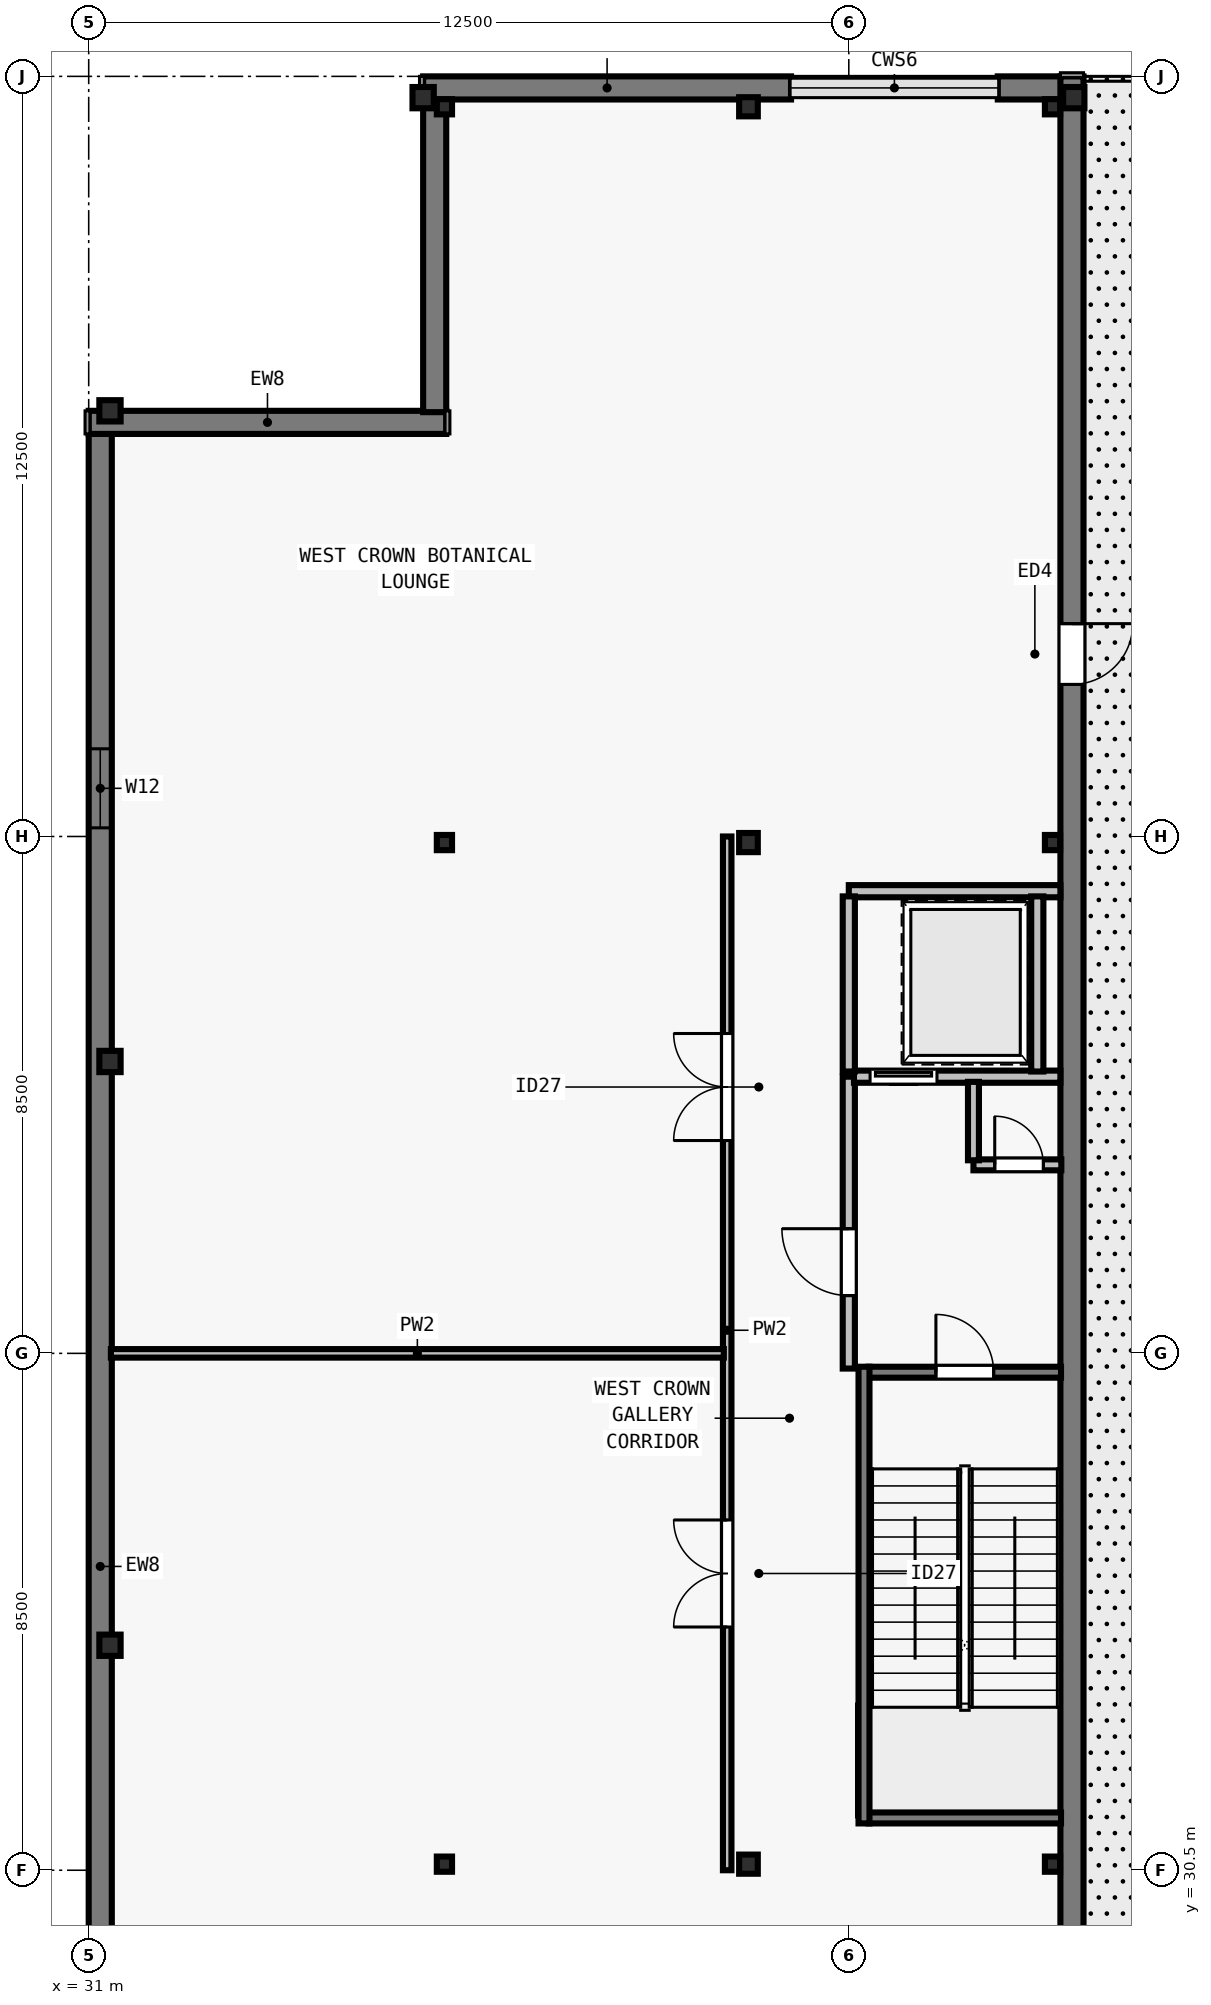
"""IFC4 building model, lengths in metres.
Left out: names, types, materials, properties, quantities, classifications, styles, units other than length and angle.
Written with IfcOpenShell. Run it as: python <this file> out.ifc"""

import sys

from ifc_helpers import new_model, si_unit, direction, frame, frame_2d, origin, origin_2d, place, context, subcontext, project, spatial, rectangle, i_section, extrude, element, fill, save


model = new_model("IFC4")
c1 = context("Model", 3, precision=1e-05, world=origin(), true_north=direction((0.0, 1.0)))
c2 = subcontext(c1, "Body", "Model", "MODEL_VIEW")
j1 = project(units=[si_unit("LENGTHUNIT", "METRE"), si_unit("PLANEANGLEUNIT", "RADIAN")], contexts=[c1])
p1 = place(None, origin())
s1 = spatial("IfcSite", under=j1, at=p1, CompositionType="ELEMENT")
p2 = place(p1, origin())
s2 = spatial("IfcBuilding", under=s1, at=p2, CompositionType="ELEMENT")
p3 = place(p2, frame((0.0, 0.0, 324.5)))
s3 = spatial("IfcBuildingStorey", under=s2, at=p3, CompositionType="ELEMENT", Elevation=324.5)
for number, where, z_axis, x_axis in (
    (1, (47.2, 59.65, 0.0), (0.0, 0.0, 1.0), (1.0, 0.0, 0.0)),
    (2, (36.5, 59.65, 0.0), (0.0, 0.0, 1.0), (1.0, 0.0, 0.0)),
    (3, (31.35, 54.5, 0.0), (0.0, 0.0, 1.0), (1.0, 0.0, 0.0)),
    (4, (31.35, 43.8, 0.0), (0.0, 0.0, 1.0), (1.0, 0.0, 0.0)),
    (5, (31.35, 34.2, 0.0), (0.0, 0.0, 1.0), (1.0, 0.0, 0.0)),
):
    element("IfcColumn", number, at=place(p3, frame(where, z_axis=z_axis, x_axis=x_axis)), inside=s3, PredefinedType="COLUMN", context=c2, shape_type="SweptSolid", body=[
        extrude(i_section(OverallWidth=0.35, OverallDepth=0.35, WebThickness=0.02, FlangeThickness=0.028, at=origin_2d()), origin(), (0.0, 0.0, 1.0), 5.5),
    ])
p4 = place(p3, frame((41.85, 30.6, 0.0), z_axis=(0.0, 0.0, 1.0), x_axis=(1.0, 0.0, 0.0)))
e6 = element("IfcColumn", 6, at=p4, inside=s3, PredefinedType="COLUMN", context=c2, shape_type="SweptSolid", body=[
    extrude(i_section(OverallWidth=0.307, OverallDepth=0.315, WebThickness=0.012, FlangeThickness=0.019, FilletRadius=0.016, at=origin_2d()), origin(), (0.0, 0.0, 1.0), 5.5),
])
for number, where, z_axis, x_axis in (
    (7, (36.85, 30.6, 0.0), (0.0, 0.0, 1.0), (1.0, 0.0, 0.0)),
    (8, (46.85, 30.6, 0.0), (0.0, 0.0, 1.0), (1.0, 0.0, 0.0)),
):
    element("IfcColumn", number, at=place(p3, frame(where, z_axis=z_axis, x_axis=x_axis)), inside=s3, PredefinedType="PILASTER", context=c2, shape_type="SweptSolid", body=[
        extrude(i_section(OverallWidth=0.203, OverallDepth=0.203, WebThickness=0.009, FlangeThickness=0.014, FilletRadius=0.01, at=origin_2d()), origin(), (0.0, 0.0, 1.0), 5.5),
    ])
p5 = place(p3, frame((41.85, 47.4, 0.0), z_axis=(0.0, 0.0, 1.0), x_axis=(1.0, 0.0, 0.0)))
e9 = element("IfcColumn", 9, at=p5, inside=s3, PredefinedType="COLUMN", context=c2, shape_type="SweptSolid", body=[
    extrude(i_section(OverallWidth=0.307, OverallDepth=0.315, WebThickness=0.012, FlangeThickness=0.019, FilletRadius=0.016, at=origin_2d()), origin(), (0.0, 0.0, 1.0), 5.5),
])
for number, where, z_axis, x_axis in (
    (10, (36.85, 47.4, 0.0), (0.0, 0.0, 1.0), (1.0, 0.0, 0.0)),
    (11, (46.85, 47.4, 0.0), (0.0, 0.0, 1.0), (1.0, 0.0, 0.0)),
):
    element("IfcColumn", number, at=place(p3, frame(where, z_axis=z_axis, x_axis=x_axis)), inside=s3, PredefinedType="PILASTER", context=c2, shape_type="SweptSolid", body=[
        extrude(i_section(OverallWidth=0.203, OverallDepth=0.203, WebThickness=0.009, FlangeThickness=0.014, FilletRadius=0.01, at=origin_2d()), origin(), (0.0, 0.0, 1.0), 5.5),
    ])
p6 = place(p3, frame((41.85, 59.5, 0.0), z_axis=(0.0, 0.0, 1.0), x_axis=(1.0, 0.0, 0.0)))
e12 = element("IfcColumn", 12, at=p6, inside=s3, PredefinedType="COLUMN", context=c2, shape_type="SweptSolid", body=[
    extrude(i_section(OverallWidth=0.307, OverallDepth=0.315, WebThickness=0.012, FlangeThickness=0.019, FilletRadius=0.016, at=origin_2d()), origin(), (0.0, 0.0, 1.0), 5.5),
])
for number, where, z_axis, x_axis in (
    (13, (36.85, 59.5, 0.0), (0.0, 0.0, 1.0), (1.0, 0.0, 0.0)),
    (14, (46.85, 59.5, 0.0), (0.0, 0.0, 1.0), (1.0, 0.0, 0.0)),
):
    element("IfcColumn", number, at=place(p3, frame(where, z_axis=z_axis, x_axis=x_axis)), inside=s3, PredefinedType="PILASTER", context=c2, shape_type="SweptSolid", body=[
        extrude(i_section(OverallWidth=0.203, OverallDepth=0.203, WebThickness=0.009, FlangeThickness=0.014, FilletRadius=0.01, at=origin_2d()), origin(), (0.0, 0.0, 1.0), 5.5),
    ])
p7 = place(p3, frame((31.19, 23.5, 0.0), z_axis=(0.0, 0.0, 1.0), x_axis=(0.0, 1.0, 0.0)))
e15 = element("IfcWall", 15, at=p7, inside=s3, PredefinedType="SOLIDWALL", context=c2, shape_type="SweptSolid", body=[
    extrude(rectangle(XDim=30.642, YDim=0.38, at=frame_2d((15.321, 0.0))), origin(), (0.0, 0.0, 1.0), 5.25),
])
p8 = place(p7, frame((24.142, 0.0, 0.8)))
e16 = element("IfcOpeningElement", 16, at=p8, cuts=e15, PredefinedType="OPENING", context=c2, shape_type="SweptSolid", body=[
    extrude(rectangle(XDim=1.3, YDim=2.05, at=frame_2d((0.65, 1.025))), frame((0.0, 0.2, 0.0), z_axis=(0.0, -1.0, 0.0), x_axis=(1.0, 0.0, 0.0)), (0.0, 0.0, 1.0), 0.4),
])
p9 = place(p3, frame((31.0, 54.31, 0.0), z_axis=(0.0, 0.0, 1.0), x_axis=(1.0, 0.0, 0.0)))
e17 = element("IfcWall", 17, at=p9, inside=s3, PredefinedType="SOLIDWALL", context=c2, shape_type="SweptSolid", body=[
    extrude(rectangle(XDim=5.88, YDim=0.38, at=frame_2d((2.94, 0.0))), origin(), (0.0, 0.0, 1.0), 5.25),
])
p10 = place(p3, frame((36.69, 54.478, 0.0), z_axis=(0.0, 0.0, 1.0), x_axis=(0.0, 1.0, 0.0)))
e18 = element("IfcWall", 18, at=p10, inside=s3, PredefinedType="SOLIDWALL", context=c2, shape_type="SweptSolid", body=[
    extrude(rectangle(XDim=5.164, YDim=0.38, at=frame_2d((2.582, 0.0))), origin(), (0.0, 0.0, 1.0), 5.25),
])
p11 = place(p3, frame((36.5, 59.81, 0.0), z_axis=(0.0, 0.0, 1.0), x_axis=(1.0, 0.0, 0.0)))
e19 = element("IfcWall", 19, at=p11, inside=s3, PredefinedType="SOLIDWALL", context=c2, shape_type="SweptSolid", body=[
    extrude(rectangle(XDim=6.05, YDim=0.38, at=frame_2d((3.025, 0.0))), origin(), (0.0, 0.0, 1.0), 5.25),
])
p12 = place(p3, frame((45.95, 59.81, 0.0), z_axis=(0.0, 0.0, 1.0), x_axis=(1.0, 0.0, 0.0)))
e20 = element("IfcWall", 20, at=p12, inside=s3, PredefinedType="SOLIDWALL", context=c2, shape_type="SweptSolid", body=[
    extrude(rectangle(XDim=1.052, YDim=0.38, at=frame_2d((0.526, 0.0))), origin(), (0.0, 0.0, 1.0), 5.25),
])
p13 = place(p3, frame((47.17, 60.0, 0.0), z_axis=(0.0, 0.0, 1.0), x_axis=(0.0, -1.0, 0.0)))
e21 = element("IfcWall", 21, at=p13, inside=s3, PredefinedType="SOLIDWALL", context=c2, shape_type="SweptSolid", body=[
    extrude(rectangle(XDim=41.642, YDim=0.38, at=frame_2d((20.821, 0.0))), origin(), (0.0, 0.0, 1.0), 5.25),
])
p14 = place(p13, frame((9.0, 0.0, 0.0)))
e22 = element("IfcOpeningElement", 22, at=p14, cuts=e21, PredefinedType="OPENING", context=c2, shape_type="SweptSolid", body=[
    extrude(rectangle(XDim=1.0, YDim=2.15, at=frame_2d((0.5, 1.075))), frame((0.0, 0.2, 0.0), z_axis=(0.0, -1.0, 0.0), x_axis=(1.0, 0.0, 0.0)), (0.0, 0.0, 1.0), 0.4),
])
p15 = place(p13, frame((33.0, 0.0, 0.0)))
e23 = element("IfcOpeningElement", 23, at=p15, cuts=e21, PredefinedType="OPENING", context=c2, shape_type="SweptSolid", body=[
    extrude(rectangle(XDim=1.0, YDim=2.15, at=frame_2d((0.5, 1.075))), frame((0.0, 0.2, 0.0), z_axis=(0.0, -1.0, 0.0), x_axis=(1.0, 0.0, 0.0)), (0.0, 0.0, 1.0), 0.4),
])
p16 = place(p3, frame((43.5, 38.75, 0.0), z_axis=(0.0, 0.0, 1.0), x_axis=(0.0, 1.0, 0.0)))
e24 = element("IfcWall", 24, at=p16, inside=s3, PredefinedType="SOLIDWALL", context=c2, shape_type="SweptSolid", body=[
    extrude(rectangle(XDim=4.8, YDim=0.2, at=frame_2d((2.4, 0.0))), origin(), (0.0, 0.0, 1.0), 5.25),
])
p17 = place(p16, frame((1.2, 0.0, 0.0)))
e25 = element("IfcOpeningElement", 25, at=p17, cuts=e24, PredefinedType="OPENING", context=c2, shape_type="SweptSolid", body=[
    extrude(rectangle(XDim=1.1, YDim=2.15, at=frame_2d((0.55, 1.075))), frame((0.0, 0.11, 0.0), z_axis=(0.0, -1.0, 0.0), x_axis=(1.0, 0.0, 0.0)), (0.0, 0.0, 1.0), 0.22),
])
p18 = place(p3, frame((43.585, 43.55, 0.0), z_axis=(0.0, 0.0, 1.0), x_axis=(1.0, 0.0, 0.0)))
e26 = element("IfcWall", 26, at=p18, inside=s3, PredefinedType="SOLIDWALL", context=c2, shape_type="SweptSolid", body=[
    extrude(rectangle(XDim=3.395, YDim=0.2, at=frame_2d((1.698, 0.0))), origin(), (0.0, 0.0, 1.0), 5.25),
])
p19 = place(p18, frame((0.265, 0.0, 0.0)))
e27 = element("IfcOpeningElement", 27, at=p19, cuts=e26, PredefinedType="OPENING", context=c2, shape_type="SweptSolid", body=[
    extrude(rectangle(XDim=1.1, YDim=2.2, at=frame_2d((0.55, 1.1))), frame((0.0, 0.11, 0.0), z_axis=(0.0, -1.0, 0.0), x_axis=(1.0, 0.0, 0.0)), (0.0, 0.0, 1.0), 0.22),
])
p20 = place(p3, frame((43.5, 46.6, 0.0), z_axis=(0.0, 0.0, 1.0), x_axis=(1.0, 0.0, 0.0)))
e28 = element("IfcWall", 28, at=p20, inside=s3, PredefinedType="SOLIDWALL", context=c2, shape_type="SweptSolid", body=[
    extrude(rectangle(XDim=3.48, YDim=0.2, at=frame_2d((1.74, 0.0))), origin(), (0.0, 0.0, 1.0), 5.25),
])
for number, where, z_axis, x_axis in (
    (29, (46.6, 43.635, 0.0), (0.0, 0.0, 1.0), (0.0, 1.0, 0.0)),
    (30, (43.5, 43.635, 0.0), (0.0, 0.0, 1.0), (0.0, 1.0, 0.0)),
):
    element("IfcWall", number, at=place(p3, frame(where, z_axis=z_axis, x_axis=x_axis)), inside=s3, PredefinedType="SOLIDWALL", context=c2, shape_type="SweptSolid", body=[
        extrude(rectangle(XDim=2.88, YDim=0.2, at=frame_2d((1.44, 0.0))), origin(), (0.0, 0.0, 1.0), 5.25),
    ])
p21 = place(p3, frame((45.55, 42.1, 0.0), z_axis=(0.0, 0.0, 1.0), x_axis=(1.0, 0.0, 0.0)))
e31 = element("IfcWall", 31, at=p21, inside=s3, PredefinedType="SOLIDWALL", context=c2, shape_type="SweptSolid", body=[
    extrude(rectangle(XDim=1.445, YDim=0.18, at=frame_2d((0.723, 0.0))), origin(), (0.0, 0.0, 1.0), 5.25),
])
p22 = place(p21, frame((0.35, 0.0, 0.0)))
e32 = element("IfcOpeningElement", 32, at=p22, cuts=e31, PredefinedType="OPENING", context=c2, shape_type="SweptSolid", body=[
    extrude(rectangle(XDim=0.8, YDim=2.08, at=frame_2d((0.4, 1.04))), frame((0.0, 0.1, 0.0), z_axis=(0.0, -1.0, 0.0), x_axis=(1.0, 0.0, 0.0)), (0.0, 0.0, 1.0), 0.2),
])
p23 = place(p3, frame((45.55, 42.175, 0.0), z_axis=(0.0, 0.0, 1.0), x_axis=(0.0, 1.0, 0.0)))
e33 = element("IfcWall", 33, at=p23, inside=s3, PredefinedType="SOLIDWALL", context=c2, shape_type="SweptSolid", body=[
    extrude(rectangle(XDim=1.29, YDim=0.18, at=frame_2d((0.645, 0.0))), origin(), (0.0, 0.0, 1.0), 5.25),
])
p24 = place(p3, frame((41.5, 30.5, 0.0), z_axis=(0.0, 0.0, 1.0), x_axis=(0.0, 1.0, 0.0)))
e34 = element("IfcWall", 34, at=p24, inside=s3, PredefinedType="PARTITIONING", context=c2, shape_type="SweptSolid", body=[
    extrude(rectangle(XDim=17.0, YDim=0.14, at=frame_2d((8.5, 0.0))), origin(), (0.0, 0.0, 1.0), 5.25),
])
p25 = place(p24, frame((4.0, 0.0, 0.0)))
e35 = element("IfcOpeningElement", 35, at=p25, cuts=e34, PredefinedType="OPENING", context=c2, shape_type="SweptSolid", body=[
    extrude(rectangle(XDim=1.76, YDim=2.2, at=frame_2d((0.88, 1.1))), frame((0.0, 0.08, 0.0), z_axis=(0.0, -1.0, 0.0), x_axis=(1.0, 0.0, 0.0)), (0.0, 0.0, 1.0), 0.16),
])
p26 = place(p24, frame((12.0, 0.0, 0.0)))
e36 = element("IfcOpeningElement", 36, at=p26, cuts=e34, PredefinedType="OPENING", context=c2, shape_type="SweptSolid", body=[
    extrude(rectangle(XDim=1.76, YDim=2.2, at=frame_2d((0.88, 1.1))), frame((0.0, 0.08, 0.0), z_axis=(0.0, -1.0, 0.0), x_axis=(1.0, 0.0, 0.0)), (0.0, 0.0, 1.0), 0.16),
])
p27 = place(p3, frame((31.365, 39.0, 0.0), z_axis=(0.0, 0.0, 1.0), x_axis=(1.0, 0.0, 0.0)))
e37 = element("IfcWall", 37, at=p27, inside=s3, PredefinedType="PARTITIONING", context=c2, shape_type="SweptSolid", body=[
    extrude(rectangle(XDim=10.08, YDim=0.14, at=frame_2d((5.04, 0.0))), origin(), (0.0, 0.0, 1.0), 5.25),
])
p28 = place(p3, frame((43.825, 38.69, 0.0), z_axis=(0.0, 0.0, 1.0), x_axis=(1.0, 0.0, 0.0)))
e38 = element("IfcWall", 38, at=p28, inside=s3, PredefinedType="SOLIDWALL", context=c2, shape_type="SweptSolid", body=[
    extrude(rectangle(XDim=3.165, YDim=0.18, at=frame_2d((1.583, 0.0))), origin(), (0.0, 0.0, 1.0), 5.25),
])
p29 = place(p28, frame((1.107, 0.0, 0.0)))
e39 = element("IfcOpeningElement", 39, at=p29, cuts=e38, PredefinedType="OPENING", context=c2, shape_type="SweptSolid", body=[
    extrude(rectangle(XDim=0.95, YDim=2.15, at=frame_2d((0.475, 1.075))), frame((0.0, 0.1, 0.0), z_axis=(0.0, -1.0, 0.0), x_axis=(1.0, 0.0, 0.0)), (0.0, 0.0, 1.0), 0.2),
])
p30 = place(p3, frame((43.825, 31.36, 0.0), z_axis=(0.0, 0.0, 1.0), x_axis=(1.0, 0.0, 0.0)))
e40 = element("IfcWall", 40, at=p30, inside=s3, PredefinedType="SOLIDWALL", context=c2, shape_type="SweptSolid", body=[
    extrude(rectangle(XDim=3.165, YDim=0.18, at=frame_2d((1.583, 0.0))), origin(), (0.0, 0.0, 1.0), 5.25),
])
p31 = place(p3, frame((43.75, 38.78, 0.0), z_axis=(0.0, 0.0, 1.0), x_axis=(0.0, -1.0, 0.0)))
e41 = element("IfcWall", 41, at=p31, inside=s3, PredefinedType="SOLIDWALL", context=c2, shape_type="SweptSolid", body=[
    extrude(rectangle(XDim=7.51, YDim=0.18, at=frame_2d((3.755, 0.0))), origin(), (0.0, 0.0, 1.0), 5.25),
])
p32 = place(p8, origin())
e42 = element("IfcWindow", 42, at=p32, inside=s3, PartitioningType="SINGLE_PANEL", PredefinedType="WINDOW", context=c2, shape_type="SweptSolid", body=[
    extrude(rectangle(XDim=1.3, YDim=2.05, at=frame_2d((0.65, 1.025))), frame((0.0, -0.05, 0.0), z_axis=(0.0, -1.0, 0.0), x_axis=(1.0, 0.0, 0.0)), (0.0, 0.0, 1.0), 0.06),
])
fill(e16, e42)
p33 = place(p14, origin())
e43 = element("IfcDoor", 43, at=p33, inside=s3, OperationType="SINGLE_SWING_LEFT", PredefinedType="DOOR", context=c2, shape_type="SweptSolid", body=[
    extrude(rectangle(XDim=1.0, YDim=2.15, at=frame_2d((0.5, 1.075))), frame((0.0, 0.025, 0.0), z_axis=(0.0, -1.0, 0.0), x_axis=(1.0, 0.0, 0.0)), (0.0, 0.0, 1.0), 0.05),
])
fill(e22, e43)
p34 = place(p22, origin())
e44 = element("IfcDoor", 44, at=p34, inside=s3, OperationType="SINGLE_SWING_LEFT", PredefinedType="DOOR", context=c2, shape_type="SweptSolid", body=[
    extrude(rectangle(XDim=0.8, YDim=2.08, at=frame_2d((0.4, 1.04))), frame((0.0, 0.025, 0.0), z_axis=(0.0, -1.0, 0.0), x_axis=(1.0, 0.0, 0.0)), (0.0, 0.0, 1.0), 0.05),
])
fill(e32, e44)
p35 = place(p17, origin())
e45 = element("IfcDoor", 45, at=p35, inside=s3, OperationType="SINGLE_SWING_RIGHT", PredefinedType="DOOR", context=c2, shape_type="SweptSolid", body=[
    extrude(rectangle(XDim=1.1, YDim=2.15, at=frame_2d((0.55, 1.075))), frame((0.0, 0.025, 0.0), z_axis=(0.0, -1.0, 0.0), x_axis=(1.0, 0.0, 0.0)), (0.0, 0.0, 1.0), 0.05),
])
fill(e25, e45)
p36 = place(p19, origin())
e46 = element("IfcDoor", 46, at=p36, inside=s3, OperationType="SLIDING_TO_LEFT", PredefinedType="DOOR", context=c2, shape_type="SweptSolid", body=[
    extrude(rectangle(XDim=1.1, YDim=2.2, at=frame_2d((0.55, 1.1))), frame((0.0, 0.025, 0.0), z_axis=(0.0, -1.0, 0.0), x_axis=(1.0, 0.0, 0.0)), (0.0, 0.0, 1.0), 0.05),
])
fill(e27, e46)
p37 = place(p25, origin())
e47 = element("IfcDoor", 47, at=p37, inside=s3, OperationType="DOUBLE_DOOR_SINGLE_SWING", PredefinedType="DOOR", context=c2, shape_type="SweptSolid", body=[
    extrude(rectangle(XDim=1.76, YDim=2.2, at=frame_2d((0.88, 1.1))), frame((0.0, 0.025, 0.0), z_axis=(0.0, -1.0, 0.0), x_axis=(1.0, 0.0, 0.0)), (0.0, 0.0, 1.0), 0.05),
])
fill(e35, e47)
p38 = place(p26, origin())
e48 = element("IfcDoor", 48, at=p38, inside=s3, OperationType="DOUBLE_DOOR_SINGLE_SWING", PredefinedType="DOOR", context=c2, shape_type="SweptSolid", body=[
    extrude(rectangle(XDim=1.76, YDim=2.2, at=frame_2d((0.88, 1.1))), frame((0.0, 0.025, 0.0), z_axis=(0.0, -1.0, 0.0), x_axis=(1.0, 0.0, 0.0)), (0.0, 0.0, 1.0), 0.05),
])
fill(e36, e48)
p39 = place(p29, origin())
e49 = element("IfcDoor", 49, at=p39, inside=s3, OperationType="SINGLE_SWING_LEFT", PredefinedType="DOOR", context=c2, shape_type="SweptSolid", body=[
    extrude(rectangle(XDim=0.95, YDim=2.15, at=frame_2d((0.475, 1.075))), frame((0.0, 0.025, 0.0), z_axis=(0.0, -1.0, 0.0), x_axis=(1.0, 0.0, 0.0)), (0.0, 0.0, 1.0), 0.05),
])
fill(e39, e49)
save(model, sys.argv[1])
